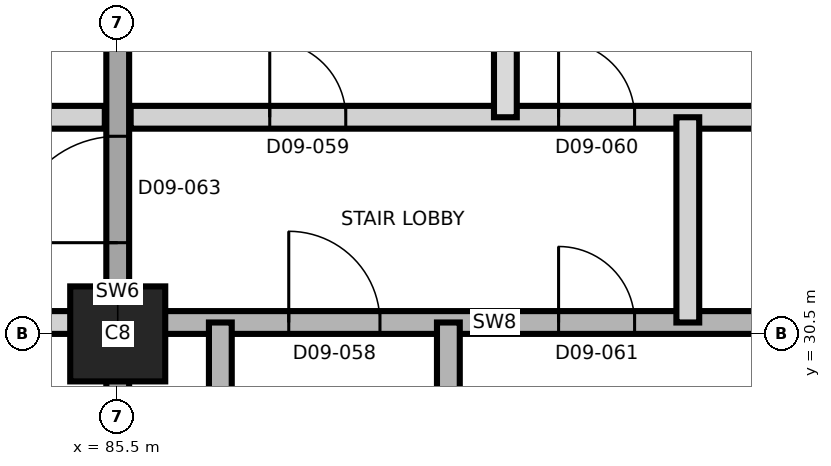
"""IFC4 building model, lengths in metres.
Left out: names, types, materials, properties, quantities, classifications, styles, units other than length and angle.
Written with IfcOpenShell. Run it as: python <this file> out.ifc"""

import sys

from ifc_helpers import new_model, si_unit, direction, frame, frame_2d, origin, origin_2d, place, context, subcontext, project, spatial, rectangle, extrude, element, fill, save


model = new_model("IFC4")
c1 = context("Model", 3, precision=1e-05, world=origin(), true_north=direction((0.0, 1.0)))
c2 = subcontext(c1, "Body", "Model", "MODEL_VIEW")
j1 = project(units=[si_unit("LENGTHUNIT", "METRE"), si_unit("PLANEANGLEUNIT", "RADIAN")], contexts=[c1])
p1 = place(None, origin())
s1 = spatial("IfcSite", under=j1, at=p1, CompositionType="ELEMENT")
p2 = place(p1, origin())
s2 = spatial("IfcBuilding", under=s1, at=p2, CompositionType="ELEMENT")
p3 = place(p2, frame((0.0, 0.0, 105.6)))
s3 = spatial("IfcBuildingStorey", under=s2, at=p3, CompositionType="ELEMENT", Elevation=105.6)
p4 = place(p3, frame((85.5, 30.5, 0.0), z_axis=(0.0, 0.0, 1.0), x_axis=(1.0, 0.0, 0.0)))
e1 = element("IfcColumn", 1, at=p4, inside=s3, PredefinedType="COLUMN", context=c2, shape_type="SweptSolid", body=[
    extrude(rectangle(XDim=1.25, YDim=1.25, at=origin_2d()), origin(), (0.0, 0.0, 1.0), 3.7),
])
p5 = place(p3, frame((85.5, 20.35, 0.0), z_axis=(0.0, 0.0, 1.0), x_axis=(0.0, 1.0, 0.0)))
e2 = element("IfcWall", 2, at=p5, inside=s3, PredefinedType="SHEAR", context=c2, shape_type="SweptSolid", body=[
    extrude(rectangle(XDim=20.3, YDim=0.3, at=frame_2d((10.15, 0.0))), origin(), (0.0, 0.0, 1.0), 3.7),
])
p6 = place(p5, frame((11.35, 0.0, 0.0)))
e3 = element("IfcOpeningElement", 3, at=p6, cuts=e2, PredefinedType="OPENING", context=c2, shape_type="SweptSolid", body=[
    extrude(rectangle(XDim=1.4, YDim=2.1, at=frame_2d((0.7, 1.05))), frame((0.0, 0.16, 0.0), z_axis=(0.0, -1.0, 0.0), x_axis=(1.0, 0.0, 0.0)), (0.0, 0.0, 1.0), 0.32),
])
p7 = place(p3, frame((58.8, 30.65, 0.0), z_axis=(0.0, 0.0, 1.0), x_axis=(1.0, 0.0, 0.0)))
e4 = element("IfcWall", 4, at=p7, inside=s3, PredefinedType="PARTITIONING", context=c2, shape_type="SweptSolid", body=[
    extrude(rectangle(XDim=26.53, YDim=0.3, at=frame_2d((13.265, 0.0))), origin(), (0.0, 0.0, 1.0), 3.4),
])
p8 = place(p7, frame((3.115, 0.0, 0.0)))
e5 = element("IfcOpeningElement", 5, at=p8, cuts=e4, PredefinedType="OPENING", context=c2, shape_type="SweptSolid", body=[
    extrude(rectangle(XDim=1.0, YDim=2.1, at=frame_2d((0.5, 1.05))), frame((0.0, 0.16, 0.0), z_axis=(0.0, -1.0, 0.0), x_axis=(1.0, 0.0, 0.0)), (0.0, 0.0, 1.0), 0.32),
])
p9 = place(p7, frame((6.065, 0.0, 0.0)))
e6 = element("IfcOpeningElement", 6, at=p9, cuts=e4, PredefinedType="OPENING", context=c2, shape_type="SweptSolid", body=[
    extrude(rectangle(XDim=1.4, YDim=2.1, at=frame_2d((0.7, 1.05))), frame((0.0, 0.16, 0.0), z_axis=(0.0, -1.0, 0.0), x_axis=(1.0, 0.0, 0.0)), (0.0, 0.0, 1.0), 0.32),
])
p10 = place(p7, frame((9.835, 0.0, 0.0)))
e7 = element("IfcOpeningElement", 7, at=p10, cuts=e4, PredefinedType="OPENING", context=c2, shape_type="SweptSolid", body=[
    extrude(rectangle(XDim=1.2, YDim=2.1, at=frame_2d((0.6, 1.05))), frame((0.0, 0.16, 0.0), z_axis=(0.0, -1.0, 0.0), x_axis=(1.0, 0.0, 0.0)), (0.0, 0.0, 1.0), 0.32),
])
p11 = place(p7, frame((13.085, 0.0, 0.0)))
e8 = element("IfcOpeningElement", 8, at=p11, cuts=e4, PredefinedType="OPENING", context=c2, shape_type="SweptSolid", body=[
    extrude(rectangle(XDim=1.0, YDim=2.1, at=frame_2d((0.5, 1.05))), frame((0.0, 0.16, 0.0), z_axis=(0.0, -1.0, 0.0), x_axis=(1.0, 0.0, 0.0)), (0.0, 0.0, 1.0), 0.32),
])
p12 = place(p7, frame((21.7, 0.0, 0.0)))
e9 = element("IfcOpeningElement", 9, at=p12, cuts=e4, PredefinedType="OPENING", context=c2, shape_type="SweptSolid", body=[
    extrude(rectangle(XDim=1.0, YDim=2.4, at=frame_2d((0.5, 1.2))), frame((0.0, 0.16, 0.0), z_axis=(0.0, -1.0, 0.0), x_axis=(1.0, 0.0, 0.0)), (0.0, 0.0, 1.0), 0.32),
])
p13 = place(p3, frame((85.67, 30.65, 0.0), z_axis=(0.0, 0.0, 1.0), x_axis=(1.0, 0.0, 0.0)))
e10 = element("IfcWall", 10, at=p13, inside=s3, PredefinedType="SHEAR", context=c2, shape_type="SweptSolid", body=[
    extrude(rectangle(XDim=9.58, YDim=0.3, at=frame_2d((4.79, 0.0))), origin(), (0.0, 0.0, 1.0), 3.4),
])
p14 = place(p13, frame((2.08, 0.0, 0.0)))
e11 = element("IfcOpeningElement", 11, at=p14, cuts=e10, PredefinedType="OPENING", context=c2, shape_type="SweptSolid", body=[
    extrude(rectangle(XDim=1.2, YDim=2.1, at=frame_2d((0.6, 1.05))), frame((0.0, 0.16, 0.0), z_axis=(0.0, -1.0, 0.0), x_axis=(1.0, 0.0, 0.0)), (0.0, 0.0, 1.0), 0.32),
])
p15 = place(p13, frame((5.63, 0.0, 0.0)))
e12 = element("IfcOpeningElement", 12, at=p15, cuts=e10, PredefinedType="OPENING", context=c2, shape_type="SweptSolid", body=[
    extrude(rectangle(XDim=1.0, YDim=2.1, at=frame_2d((0.5, 1.05))), frame((0.0, 0.16, 0.0), z_axis=(0.0, -1.0, 0.0), x_axis=(1.0, 0.0, 0.0)), (0.0, 0.0, 1.0), 0.32),
])
p16 = place(p3, frame((58.8, 33.35, 0.0), z_axis=(0.0, 0.0, 1.0), x_axis=(1.0, 0.0, 0.0)))
e13 = element("IfcWall", 13, at=p16, inside=s3, PredefinedType="PARTITIONING", context=c2, shape_type="SweptSolid", body=[
    extrude(rectangle(XDim=26.53, YDim=0.3, at=frame_2d((13.265, 0.0))), origin(), (0.0, 0.0, 1.0), 3.4),
])
p17 = place(p16, frame((2.05, 0.0, 0.0)))
e14 = element("IfcOpeningElement", 14, at=p17, cuts=e13, PredefinedType="OPENING", context=c2, shape_type="SweptSolid", body=[
    extrude(rectangle(XDim=1.0, YDim=2.4, at=frame_2d((0.5, 1.2))), frame((0.0, 0.16, 0.0), z_axis=(0.0, -1.0, 0.0), x_axis=(1.0, 0.0, 0.0)), (0.0, 0.0, 1.0), 0.32),
])
p18 = place(p16, frame((11.95, 0.0, 0.0)))
e15 = element("IfcOpeningElement", 15, at=p18, cuts=e13, PredefinedType="OPENING", context=c2, shape_type="SweptSolid", body=[
    extrude(rectangle(XDim=1.0, YDim=2.1, at=frame_2d((0.5, 1.05))), frame((0.0, 0.16, 0.0), z_axis=(0.0, -1.0, 0.0), x_axis=(1.0, 0.0, 0.0)), (0.0, 0.0, 1.0), 0.32),
])
p19 = place(p16, frame((13.6, 0.0, 0.0)))
e16 = element("IfcOpeningElement", 16, at=p19, cuts=e13, PredefinedType="OPENING", context=c2, shape_type="SweptSolid", body=[
    extrude(rectangle(XDim=1.0, YDim=2.1, at=frame_2d((0.5, 1.05))), frame((0.0, 0.16, 0.0), z_axis=(0.0, -1.0, 0.0), x_axis=(1.0, 0.0, 0.0)), (0.0, 0.0, 1.0), 0.32),
])
p20 = place(p16, frame((21.7, 0.0, 0.0)))
e17 = element("IfcOpeningElement", 17, at=p20, cuts=e13, PredefinedType="OPENING", context=c2, shape_type="SweptSolid", body=[
    extrude(rectangle(XDim=1.0, YDim=2.4, at=frame_2d((0.5, 1.2))), frame((0.0, 0.16, 0.0), z_axis=(0.0, -1.0, 0.0), x_axis=(1.0, 0.0, 0.0)), (0.0, 0.0, 1.0), 0.32),
])
p21 = place(p3, frame((85.67, 33.35, 0.0), z_axis=(0.0, 0.0, 1.0), x_axis=(1.0, 0.0, 0.0)))
e18 = element("IfcWall", 18, at=p21, inside=s3, PredefinedType="PARTITIONING", context=c2, shape_type="SweptSolid", body=[
    extrude(rectangle(XDim=9.58, YDim=0.3, at=frame_2d((4.79, 0.0))), origin(), (0.0, 0.0, 1.0), 3.4),
])
p22 = place(p21, frame((1.83, 0.0, 0.0)))
e19 = element("IfcOpeningElement", 19, at=p22, cuts=e18, PredefinedType="OPENING", context=c2, shape_type="SweptSolid", body=[
    extrude(rectangle(XDim=1.0, YDim=2.1, at=frame_2d((0.5, 1.05))), frame((0.0, 0.16, 0.0), z_axis=(0.0, -1.0, 0.0), x_axis=(1.0, 0.0, 0.0)), (0.0, 0.0, 1.0), 0.32),
])
p23 = place(p21, frame((5.63, 0.0, 0.0)))
e20 = element("IfcOpeningElement", 20, at=p23, cuts=e18, PredefinedType="OPENING", context=c2, shape_type="SweptSolid", body=[
    extrude(rectangle(XDim=1.0, YDim=2.1, at=frame_2d((0.5, 1.05))), frame((0.0, 0.16, 0.0), z_axis=(0.0, -1.0, 0.0), x_axis=(1.0, 0.0, 0.0)), (0.0, 0.0, 1.0), 0.32),
])
for number, where, z_axis, x_axis in (
    (21, (86.85, 21.8, 0.0), (0.0, 0.0, 1.0), (0.0, 1.0, 0.0)),
    (22, (89.85, 21.8, 0.0), (0.0, 0.0, 1.0), (0.0, 1.0, 0.0)),
):
    element("IfcWall", number, at=place(p3, frame(where, z_axis=z_axis, x_axis=x_axis)), inside=s3, PredefinedType="SHEAR", context=c2, shape_type="SweptSolid", body=[
        extrude(rectangle(XDim=8.85, YDim=0.3, at=frame_2d((4.425, 0.0))), origin(), (0.0, 0.0, 1.0), 3.4),
    ])
p24 = place(p3, frame((90.6, 33.35, 0.0), z_axis=(0.0, 0.0, 1.0), x_axis=(0.0, 1.0, 0.0)))
e23 = element("IfcWall", 23, at=p24, inside=s3, PredefinedType="PARTITIONING", context=c2, shape_type="SweptSolid", body=[
    extrude(rectangle(XDim=6.898, YDim=0.3, at=frame_2d((3.449, 0.0))), origin(), (0.0, 0.0, 1.0), 3.4),
])
p25 = place(p3, frame((93.0, 30.65, 0.0), z_axis=(0.0, 0.0, 1.0), x_axis=(0.0, 1.0, 0.0)))
e24 = element("IfcWall", 24, at=p25, inside=s3, PredefinedType="PARTITIONING", context=c2, shape_type="SweptSolid", body=[
    extrude(rectangle(XDim=2.7, YDim=0.3, at=frame_2d((1.35, 0.0))), origin(), (0.0, 0.0, 1.0), 3.4),
])
p26 = place(p14, origin())
e25 = element("IfcDoor", 25, at=p26, inside=s3, OperationType="SINGLE_SWING_LEFT", PredefinedType="DOOR", context=c2, shape_type="SweptSolid", body=[
    extrude(rectangle(XDim=1.2, YDim=2.1, at=frame_2d((0.6, 1.05))), frame((0.0, 0.025, 0.0), z_axis=(0.0, -1.0, 0.0), x_axis=(1.0, 0.0, 0.0)), (0.0, 0.0, 1.0), 0.05),
])
fill(e11, e25)
p27 = place(p22, origin())
e26 = element("IfcDoor", 26, at=p27, inside=s3, OperationType="SINGLE_SWING_LEFT", PredefinedType="DOOR", context=c2, shape_type="SweptSolid", body=[
    extrude(rectangle(XDim=1.0, YDim=2.1, at=frame_2d((0.5, 1.05))), frame((0.0, 0.025, 0.0), z_axis=(0.0, -1.0, 0.0), x_axis=(1.0, 0.0, 0.0)), (0.0, 0.0, 1.0), 0.05),
])
fill(e19, e26)
p28 = place(p23, origin())
e27 = element("IfcDoor", 27, at=p28, inside=s3, OperationType="SINGLE_SWING_RIGHT", PredefinedType="DOOR", context=c2, shape_type="SweptSolid", body=[
    extrude(rectangle(XDim=1.0, YDim=2.1, at=frame_2d((0.5, 1.05))), frame((0.0, 0.025, 0.0), z_axis=(0.0, -1.0, 0.0), x_axis=(1.0, 0.0, 0.0)), (0.0, 0.0, 1.0), 0.05),
])
fill(e20, e27)
p29 = place(p15, origin())
e28 = element("IfcDoor", 28, at=p29, inside=s3, OperationType="SINGLE_SWING_LEFT", PredefinedType="DOOR", context=c2, shape_type="SweptSolid", body=[
    extrude(rectangle(XDim=1.0, YDim=2.1, at=frame_2d((0.5, 1.05))), frame((0.0, 0.025, 0.0), z_axis=(0.0, -1.0, 0.0), x_axis=(1.0, 0.0, 0.0)), (0.0, 0.0, 1.0), 0.05),
])
fill(e12, e28)
p30 = place(p6, origin())
e29 = element("IfcDoor", 29, at=p30, inside=s3, OperationType="SINGLE_SWING_RIGHT", PredefinedType="DOOR", context=c2, shape_type="SweptSolid", body=[
    extrude(rectangle(XDim=1.4, YDim=2.1, at=frame_2d((0.7, 1.05))), frame((0.0, 0.025, 0.0), z_axis=(0.0, -1.0, 0.0), x_axis=(1.0, 0.0, 0.0)), (0.0, 0.0, 1.0), 0.05),
])
fill(e3, e29)
save(model, sys.argv[1])
